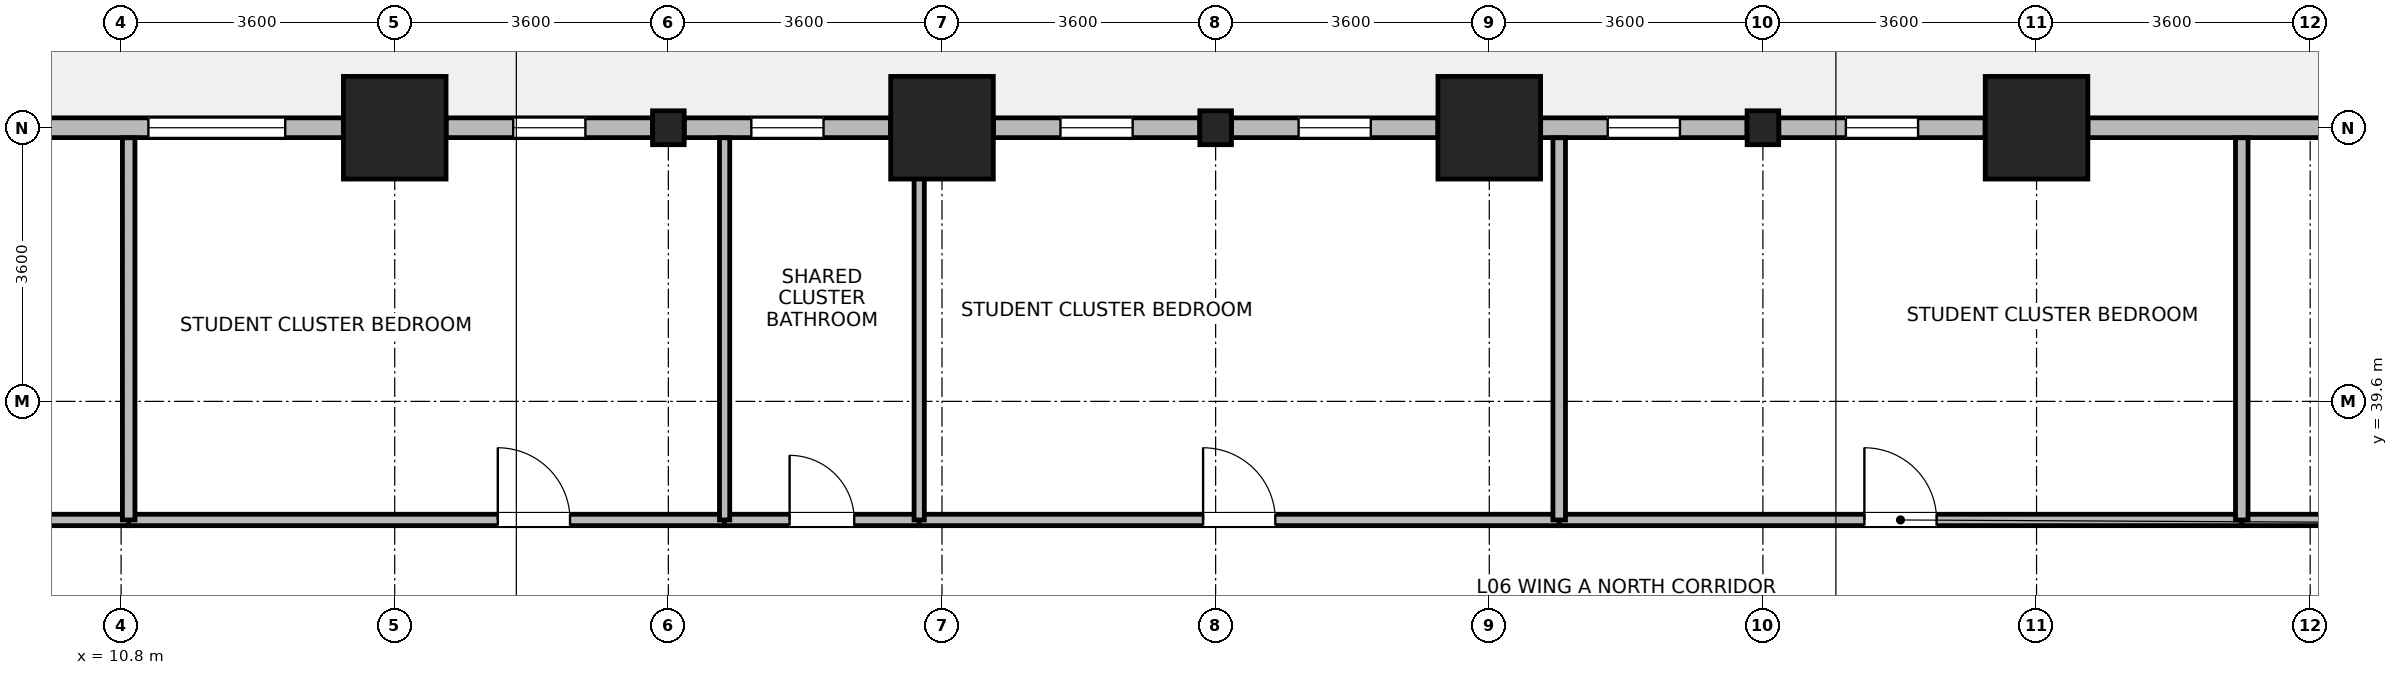
"""IFC4 building model, lengths in metres.
Left out: names, types, materials, properties, quantities, classifications, styles, units other than length and angle.
Written with IfcOpenShell. Run it as: python <this file> out.ifc"""

import sys

from ifc_helpers import new_model, si_unit, direction, frame, frame_2d, origin, origin_2d, place, context, subcontext, project, spatial, rectangle, i_section, extrude, source, transform, mapped, element, fill, save


model = new_model("IFC4")
c1 = context("Model", 3, precision=1e-05, world=origin(), true_north=direction((0.0, 1.0)))
c2 = subcontext(c1, "Body", "Model", "MODEL_VIEW")
j1 = project(units=[si_unit("LENGTHUNIT", "METRE"), si_unit("PLANEANGLEUNIT", "RADIAN")], contexts=[c1])
p1 = place(None, origin())
s1 = spatial("IfcSite", under=j1, at=p1, CompositionType="ELEMENT")
p2 = place(p1, origin())
s2 = spatial("IfcBuilding", under=s1, at=p2, CompositionType="ELEMENT")
p3 = place(p2, frame((0.0, 0.0, 29.0)))
s3 = spatial("IfcBuildingStorey", under=s2, at=p3, CompositionType="ELEMENT", Elevation=29.0)
m1 = source(origin(), c2, "Body", "SweptSolid", [
    extrude(rectangle(XDim=1.35, YDim=1.35, at=origin_2d()), origin(), (0.0, 0.0, 1.0), 3.7),
])
for number, where, z_axis, x_axis in (
    (1, (14.4, 43.2, 0.0), (0.0, 0.0, 1.0), (1.0, 0.0, 0.0)),
    (2, (21.6, 43.2, 0.0), (0.0, 0.0, 1.0), (1.0, 0.0, 0.0)),
    (3, (28.8, 43.2, 0.0), (0.0, 0.0, 1.0), (1.0, 0.0, 0.0)),
    (4, (36.0, 43.2, 0.0), (0.0, 0.0, 1.0), (1.0, 0.0, 0.0)),
):
    element("IfcColumn", number, at=place(p3, frame(where, z_axis=z_axis, x_axis=x_axis)), inside=s3, PredefinedType="COLUMN", context=c2, shape_type="MappedRepresentation", body=[
        mapped(m1, transform((0.0, 0.0, 0.0), x_axis=(1.0, 0.0, 0.0), y_axis=(0.0, 1.0, 0.0), z_axis=(0.0, 0.0, 1.0), scale=1.0)),
    ])
m2 = source(origin(), c2, "Body", "SweptSolid", [
    extrude(i_section(OverallWidth=0.416, OverallDepth=0.446, WebThickness=0.029, FlangeThickness=0.04, FilletRadius=0.015, at=origin_2d()), origin(), (0.0, 0.0, 1.0), 3.7),
])
for number, where, z_axis, x_axis in (
    (5, (18.0, 43.2, 0.0), (0.0, 0.0, 1.0), (1.0, 0.0, 0.0)),
    (6, (25.2, 43.2, 0.0), (0.0, 0.0, 1.0), (1.0, 0.0, 0.0)),
    (7, (32.4, 43.2, 0.0), (0.0, 0.0, 1.0), (1.0, 0.0, 0.0)),
):
    element("IfcColumn", number, at=place(p3, frame(where, z_axis=z_axis, x_axis=x_axis)), inside=s3, PredefinedType="COLUMN", context=c2, shape_type="MappedRepresentation", body=[
        mapped(m2, transform((0.0, 0.0, 0.0), x_axis=(1.0, 0.0, 0.0), y_axis=(0.0, 1.0, 0.0), z_axis=(0.0, 0.0, 1.0), scale=1.0)),
    ])
p4 = place(p3, frame((36.676, 43.2, 0.0), z_axis=(0.0, 0.0, 1.0), x_axis=(1.0, 0.0, 0.0)))
e8 = element("IfcWall", 8, at=p4, inside=s3, PredefinedType="STANDARD", context=c2, shape_type="SweptSolid", body=[
    extrude(rectangle(XDim=9.448, YDim=0.26, at=frame_2d((4.724, 0.0))), origin(), (0.0, 0.0, 1.0), 2.93),
])
p5 = place(p4, frame((3.824, 0.0, 0.85)))
e9 = element("IfcOpeningElement", 9, at=p5, cuts=e8, PredefinedType="OPENING", context=c2, shape_type="SweptSolid", body=[
    extrude(rectangle(XDim=1.8, YDim=1.85, at=frame_2d((0.9, 0.925))), frame((0.0, 0.14, 0.0), z_axis=(0.0, -1.0, 0.0), x_axis=(1.0, 0.0, 0.0)), (0.0, 0.0, 1.0), 0.28),
])
p6 = place(p4, frame((6.973, 0.0, 0.85)))
e10 = element("IfcOpeningElement", 10, at=p6, cuts=e8, PredefinedType="OPENING", context=c2, shape_type="SweptSolid", body=[
    extrude(rectangle(XDim=1.8, YDim=1.85, at=frame_2d((0.9, 0.925))), frame((0.0, 0.14, 0.0), z_axis=(0.0, -1.0, 0.0), x_axis=(1.0, 0.0, 0.0)), (0.0, 0.0, 1.0), 0.28),
])
p7 = place(p3, frame((32.609, 43.2, 0.0), z_axis=(0.0, 0.0, 1.0), x_axis=(1.0, 0.0, 0.0)))
e11 = element("IfcWall", 11, at=p7, inside=s3, PredefinedType="STANDARD", context=c2, shape_type="SweptSolid", body=[
    extrude(rectangle(XDim=2.715, YDim=0.26, at=frame_2d((1.357, 0.0))), origin(), (0.0, 0.0, 1.0), 2.93),
])
p8 = place(p7, frame((0.883, 0.0, 0.85)))
e12 = element("IfcOpeningElement", 12, at=p8, cuts=e11, PredefinedType="OPENING", context=c2, shape_type="SweptSolid", body=[
    extrude(rectangle(XDim=0.95, YDim=1.75, at=frame_2d((0.475, 0.875))), frame((0.0, 0.14, 0.0), z_axis=(0.0, -1.0, 0.0), x_axis=(1.0, 0.0, 0.0)), (0.0, 0.0, 1.0), 0.28),
])
p9 = place(p3, frame((29.476, 43.2, 0.0), z_axis=(0.0, 0.0, 1.0), x_axis=(1.0, 0.0, 0.0)))
e13 = element("IfcWall", 13, at=p9, inside=s3, PredefinedType="STANDARD", context=c2, shape_type="SweptSolid", body=[
    extrude(rectangle(XDim=2.715, YDim=0.26, at=frame_2d((1.357, 0.0))), origin(), (0.0, 0.0, 1.0), 2.93),
])
p10 = place(p9, frame((0.883, 0.0, 0.85)))
e14 = element("IfcOpeningElement", 14, at=p10, cuts=e13, PredefinedType="OPENING", context=c2, shape_type="SweptSolid", body=[
    extrude(rectangle(XDim=0.95, YDim=1.75, at=frame_2d((0.475, 0.875))), frame((0.0, 0.14, 0.0), z_axis=(0.0, -1.0, 0.0), x_axis=(1.0, 0.0, 0.0)), (0.0, 0.0, 1.0), 0.28),
])
p11 = place(p3, frame((25.409, 43.2, 0.0), z_axis=(0.0, 0.0, 1.0), x_axis=(1.0, 0.0, 0.0)))
e15 = element("IfcWall", 15, at=p11, inside=s3, PredefinedType="STANDARD", context=c2, shape_type="SweptSolid", body=[
    extrude(rectangle(XDim=2.715, YDim=0.26, at=frame_2d((1.357, 0.0))), origin(), (0.0, 0.0, 1.0), 2.93),
])
p12 = place(p11, frame((0.883, 0.0, 0.85)))
e16 = element("IfcOpeningElement", 16, at=p12, cuts=e15, PredefinedType="OPENING", context=c2, shape_type="SweptSolid", body=[
    extrude(rectangle(XDim=0.95, YDim=1.75, at=frame_2d((0.475, 0.875))), frame((0.0, 0.14, 0.0), z_axis=(0.0, -1.0, 0.0), x_axis=(1.0, 0.0, 0.0)), (0.0, 0.0, 1.0), 0.28),
])
p13 = place(p3, frame((22.276, 43.2, 0.0), z_axis=(0.0, 0.0, 1.0), x_axis=(1.0, 0.0, 0.0)))
e17 = element("IfcWall", 17, at=p13, inside=s3, PredefinedType="STANDARD", context=c2, shape_type="SweptSolid", body=[
    extrude(rectangle(XDim=2.715, YDim=0.26, at=frame_2d((1.357, 0.0))), origin(), (0.0, 0.0, 1.0), 2.93),
])
p14 = place(p13, frame((0.883, 0.0, 0.85)))
e18 = element("IfcOpeningElement", 18, at=p14, cuts=e17, PredefinedType="OPENING", context=c2, shape_type="SweptSolid", body=[
    extrude(rectangle(XDim=0.95, YDim=1.75, at=frame_2d((0.475, 0.875))), frame((0.0, 0.14, 0.0), z_axis=(0.0, -1.0, 0.0), x_axis=(1.0, 0.0, 0.0)), (0.0, 0.0, 1.0), 0.28),
])
p15 = place(p3, frame((18.209, 43.2, 0.0), z_axis=(0.0, 0.0, 1.0), x_axis=(1.0, 0.0, 0.0)))
e19 = element("IfcWall", 19, at=p15, inside=s3, PredefinedType="STANDARD", context=c2, shape_type="SweptSolid", body=[
    extrude(rectangle(XDim=2.715, YDim=0.26, at=frame_2d((1.357, 0.0))), origin(), (0.0, 0.0, 1.0), 2.93),
])
p16 = place(p15, frame((0.883, 0.0, 0.85)))
e20 = element("IfcOpeningElement", 20, at=p16, cuts=e19, PredefinedType="OPENING", context=c2, shape_type="SweptSolid", body=[
    extrude(rectangle(XDim=0.95, YDim=1.75, at=frame_2d((0.475, 0.875))), frame((0.0, 0.14, 0.0), z_axis=(0.0, -1.0, 0.0), x_axis=(1.0, 0.0, 0.0)), (0.0, 0.0, 1.0), 0.28),
])
p17 = place(p3, frame((15.076, 43.2, 0.0), z_axis=(0.0, 0.0, 1.0), x_axis=(1.0, 0.0, 0.0)))
e21 = element("IfcWall", 21, at=p17, inside=s3, PredefinedType="STANDARD", context=c2, shape_type="SweptSolid", body=[
    extrude(rectangle(XDim=2.715, YDim=0.26, at=frame_2d((1.357, 0.0))), origin(), (0.0, 0.0, 1.0), 2.93),
])
p18 = place(p17, frame((0.883, 0.0, 0.85)))
e22 = element("IfcOpeningElement", 22, at=p18, cuts=e21, PredefinedType="OPENING", context=c2, shape_type="SweptSolid", body=[
    extrude(rectangle(XDim=0.95, YDim=1.75, at=frame_2d((0.475, 0.875))), frame((0.0, 0.14, 0.0), z_axis=(0.0, -1.0, 0.0), x_axis=(1.0, 0.0, 0.0)), (0.0, 0.0, 1.0), 0.28),
])
p19 = place(p3, frame((3.735, 43.2, 0.0), z_axis=(0.0, 0.0, 1.0), x_axis=(1.0, 0.0, 0.0)))
e23 = element("IfcWall", 23, at=p19, inside=s3, PredefinedType="STANDARD", context=c2, shape_type="SweptSolid", body=[
    extrude(rectangle(XDim=9.989, YDim=0.26, at=frame_2d((4.995, 0.0))), origin(), (0.0, 0.0, 1.0), 3.43),
])
p20 = place(p19, frame((0.765, 0.0, 0.85)))
e24 = element("IfcOpeningElement", 24, at=p20, cuts=e23, PredefinedType="OPENING", context=c2, shape_type="SweptSolid", body=[
    extrude(rectangle(XDim=1.8, YDim=1.85, at=frame_2d((0.9, 0.925))), frame((0.0, 0.14, 0.0), z_axis=(0.0, -1.0, 0.0), x_axis=(1.0, 0.0, 0.0)), (0.0, 0.0, 1.0), 0.28),
])
p21 = place(p19, frame((4.094, 0.0, 0.85)))
e25 = element("IfcOpeningElement", 25, at=p21, cuts=e23, PredefinedType="OPENING", context=c2, shape_type="SweptSolid", body=[
    extrude(rectangle(XDim=1.8, YDim=1.85, at=frame_2d((0.9, 0.925))), frame((0.0, 0.14, 0.0), z_axis=(0.0, -1.0, 0.0), x_axis=(1.0, 0.0, 0.0)), (0.0, 0.0, 1.0), 0.28),
])
p22 = place(p19, frame((7.424, 0.0, 0.85)))
e26 = element("IfcOpeningElement", 26, at=p22, cuts=e23, PredefinedType="OPENING", context=c2, shape_type="SweptSolid", body=[
    extrude(rectangle(XDim=1.8, YDim=1.85, at=frame_2d((0.9, 0.925))), frame((0.0, 0.14, 0.0), z_axis=(0.0, -1.0, 0.0), x_axis=(1.0, 0.0, 0.0)), (0.0, 0.0, 1.0), 0.28),
])
p23 = place(p3, frame((38.7, 38.04, 0.0), z_axis=(0.0, 0.0, 1.0), x_axis=(1.0, 0.0, 0.0)))
e27 = element("IfcWall", 27, at=p23, inside=s3, PredefinedType="PARTITIONING", context=c2, shape_type="SweptSolid", body=[
    extrude(rectangle(XDim=17.06, YDim=0.15, at=frame_2d((8.53, 0.0))), origin(), (0.0, 0.0, 1.0), 3.43),
])
p24 = place(p23, frame((6.374, 0.0, 0.0)))
e28 = element("IfcOpeningElement", 28, at=p24, cuts=e27, PredefinedType="OPENING", context=c2, shape_type="SweptSolid", body=[
    extrude(rectangle(XDim=0.9, YDim=2.08, at=frame_2d((0.45, 1.04))), frame((0.0, 0.085, 0.0), z_axis=(0.0, -1.0, 0.0), x_axis=(1.0, 0.0, 0.0)), (0.0, 0.0, 1.0), 0.17),
])
p25 = place(p3, frame((29.72, 38.04, 0.0), z_axis=(0.0, 0.0, 1.0), x_axis=(1.0, 0.0, 0.0)))
e29 = element("IfcWall", 29, at=p25, inside=s3, PredefinedType="PARTITIONING", context=c2, shape_type="SweptSolid", body=[
    extrude(rectangle(XDim=8.98, YDim=0.15, at=frame_2d((4.49, 0.0))), origin(), (0.0, 0.0, 1.0), 3.43),
])
p26 = place(p25, frame((4.015, 0.0, 0.0)))
e30 = element("IfcOpeningElement", 30, at=p26, cuts=e29, PredefinedType="OPENING", context=c2, shape_type="SweptSolid", body=[
    extrude(rectangle(XDim=0.95, YDim=2.1, at=frame_2d((0.475, 1.05))), frame((0.0, 0.085, 0.0), z_axis=(0.0, -1.0, 0.0), x_axis=(1.0, 0.0, 0.0)), (0.0, 0.0, 1.0), 0.17),
])
p27 = place(p3, frame((21.3, 38.04, 0.0), z_axis=(0.0, 0.0, 1.0), x_axis=(1.0, 0.0, 0.0)))
e31 = element("IfcWall", 31, at=p27, inside=s3, PredefinedType="PARTITIONING", context=c2, shape_type="SweptSolid", body=[
    extrude(rectangle(XDim=8.42, YDim=0.15, at=frame_2d((4.21, 0.0))), origin(), (0.0, 0.0, 1.0), 3.43),
])
p28 = place(p27, frame((3.735, 0.0, 0.0)))
e32 = element("IfcOpeningElement", 32, at=p28, cuts=e31, PredefinedType="OPENING", context=c2, shape_type="SweptSolid", body=[
    extrude(rectangle(XDim=0.95, YDim=2.1, at=frame_2d((0.475, 1.05))), frame((0.0, 0.085, 0.0), z_axis=(0.0, -1.0, 0.0), x_axis=(1.0, 0.0, 0.0)), (0.0, 0.0, 1.0), 0.17),
])
p29 = place(p3, frame((10.9, 38.04, 0.0), z_axis=(0.0, 0.0, 1.0), x_axis=(1.0, 0.0, 0.0)))
e33 = element("IfcWall", 33, at=p29, inside=s3, PredefinedType="PARTITIONING", context=c2, shape_type="SweptSolid", body=[
    extrude(rectangle(XDim=7.84, YDim=0.15, at=frame_2d((3.92, 0.0))), origin(), (0.0, 0.0, 1.0), 3.43),
])
p30 = place(p29, frame((4.856, 0.0, 0.0)))
e34 = element("IfcOpeningElement", 34, at=p30, cuts=e33, PredefinedType="OPENING", context=c2, shape_type="SweptSolid", body=[
    extrude(rectangle(XDim=0.95, YDim=2.1, at=frame_2d((0.475, 1.05))), frame((0.0, 0.085, 0.0), z_axis=(0.0, -1.0, 0.0), x_axis=(1.0, 0.0, 0.0)), (0.0, 0.0, 1.0), 0.17),
])
p31 = place(p3, frame((3.732, 38.04, 0.0), z_axis=(0.0, 0.0, 1.0), x_axis=(1.0, 0.0, 0.0)))
e35 = element("IfcWall", 35, at=p31, inside=s3, PredefinedType="PARTITIONING", context=c2, shape_type="SweptSolid", body=[
    extrude(rectangle(XDim=7.168, YDim=0.15, at=frame_2d((3.584, 0.0))), origin(), (0.0, 0.0, 1.0), 3.43),
])
p32 = place(p31, frame((4.399, 0.0, 0.0)))
e36 = element("IfcOpeningElement", 36, at=p32, cuts=e35, PredefinedType="OPENING", context=c2, shape_type="SweptSolid", body=[
    extrude(rectangle(XDim=0.95, YDim=2.1, at=frame_2d((0.475, 1.05))), frame((0.0, 0.085, 0.0), z_axis=(0.0, -1.0, 0.0), x_axis=(1.0, 0.0, 0.0)), (0.0, 0.0, 1.0), 0.17),
])
p33 = place(p3, frame((18.74, 38.04, 0.0), z_axis=(0.0, 0.0, 1.0), x_axis=(1.0, 0.0, 0.0)))
e37 = element("IfcWall", 37, at=p33, inside=s3, PredefinedType="PARTITIONING", context=c2, shape_type="SweptSolid", body=[
    extrude(rectangle(XDim=2.56, YDim=0.15, at=frame_2d((1.28, 0.0))), origin(), (0.0, 0.0, 1.0), 3.43),
])
p34 = place(p33, frame((0.855, 0.0, 0.0)))
e38 = element("IfcOpeningElement", 38, at=p34, cuts=e37, PredefinedType="OPENING", context=c2, shape_type="SweptSolid", body=[
    extrude(rectangle(XDim=0.85, YDim=2.04, at=frame_2d((0.425, 1.02))), frame((0.0, 0.085, 0.0), z_axis=(0.0, -1.0, 0.0), x_axis=(1.0, 0.0, 0.0)), (0.0, 0.0, 1.0), 0.17),
])
p35 = place(p3, frame((10.9, 38.04, 0.0), z_axis=(0.0, 0.0, 1.0), x_axis=(0.0, 1.0, 0.0)))
e39 = element("IfcWall", 39, at=p35, inside=s3, PredefinedType="PARTITIONING", context=c2, shape_type="SweptSolid", body=[
    extrude(rectangle(XDim=5.028, YDim=0.165, at=frame_2d((2.514, 0.0))), origin(), (0.0, 0.0, 1.0), 3.43),
])
for number, where, z_axis, x_axis in (
    (40, (18.74, 38.04, 0.0), (0.0, 0.0, 1.0), (0.0, 1.0, 0.0)),
    (41, (21.3, 38.04, 0.0), (0.0, 0.0, 1.0), (0.0, 1.0, 0.0)),
):
    element("IfcWall", number, at=place(p3, frame(where, z_axis=z_axis, x_axis=x_axis)), inside=s3, PredefinedType="PARTITIONING", context=c2, shape_type="SweptSolid", body=[
        extrude(rectangle(XDim=5.028, YDim=0.135, at=frame_2d((2.514, 0.0))), origin(), (0.0, 0.0, 1.0), 3.43),
    ])
for number, where, z_axis, x_axis in (
    (42, (29.72, 38.04, 0.0), (0.0, 0.0, 1.0), (0.0, 1.0, 0.0)),
    (43, (38.7, 38.04, 0.0), (0.0, 0.0, 1.0), (0.0, 1.0, 0.0)),
):
    element("IfcWall", number, at=place(p3, frame(where, z_axis=z_axis, x_axis=x_axis)), inside=s3, PredefinedType="PARTITIONING", context=c2, shape_type="SweptSolid", body=[
        extrude(rectangle(XDim=5.028, YDim=0.165, at=frame_2d((2.514, 0.0))), origin(), (0.0, 0.0, 1.0), 3.43),
    ])
p36 = place(p8, origin())
e44 = element("IfcWindow", 44, at=p36, inside=s3, PartitioningType="SINGLE_PANEL", PredefinedType="WINDOW", context=c2, shape_type="SweptSolid", body=[
    extrude(rectangle(XDim=0.95, YDim=1.75, at=frame_2d((0.475, 0.875))), frame((0.0, 0.03, 0.0), z_axis=(0.0, -1.0, 0.0), x_axis=(1.0, 0.0, 0.0)), (0.0, 0.0, 1.0), 0.06),
])
fill(e12, e44)
p37 = place(p10, origin())
e45 = element("IfcWindow", 45, at=p37, inside=s3, PartitioningType="SINGLE_PANEL", PredefinedType="WINDOW", context=c2, shape_type="SweptSolid", body=[
    extrude(rectangle(XDim=0.95, YDim=1.75, at=frame_2d((0.475, 0.875))), frame((0.0, 0.03, 0.0), z_axis=(0.0, -1.0, 0.0), x_axis=(1.0, 0.0, 0.0)), (0.0, 0.0, 1.0), 0.06),
])
fill(e14, e45)
p38 = place(p12, origin())
e46 = element("IfcWindow", 46, at=p38, inside=s3, PartitioningType="SINGLE_PANEL", PredefinedType="WINDOW", context=c2, shape_type="SweptSolid", body=[
    extrude(rectangle(XDim=0.95, YDim=1.75, at=frame_2d((0.475, 0.875))), frame((0.0, 0.03, 0.0), z_axis=(0.0, -1.0, 0.0), x_axis=(1.0, 0.0, 0.0)), (0.0, 0.0, 1.0), 0.06),
])
fill(e16, e46)
p39 = place(p14, origin())
e47 = element("IfcWindow", 47, at=p39, inside=s3, PartitioningType="SINGLE_PANEL", PredefinedType="WINDOW", context=c2, shape_type="SweptSolid", body=[
    extrude(rectangle(XDim=0.95, YDim=1.75, at=frame_2d((0.475, 0.875))), frame((0.0, 0.03, 0.0), z_axis=(0.0, -1.0, 0.0), x_axis=(1.0, 0.0, 0.0)), (0.0, 0.0, 1.0), 0.06),
])
fill(e18, e47)
p40 = place(p16, origin())
e48 = element("IfcWindow", 48, at=p40, inside=s3, PartitioningType="SINGLE_PANEL", PredefinedType="WINDOW", context=c2, shape_type="SweptSolid", body=[
    extrude(rectangle(XDim=0.95, YDim=1.75, at=frame_2d((0.475, 0.875))), frame((0.0, 0.03, 0.0), z_axis=(0.0, -1.0, 0.0), x_axis=(1.0, 0.0, 0.0)), (0.0, 0.0, 1.0), 0.06),
])
fill(e20, e48)
p41 = place(p18, origin())
e49 = element("IfcWindow", 49, at=p41, inside=s3, PartitioningType="SINGLE_PANEL", PredefinedType="WINDOW", context=c2, shape_type="SweptSolid", body=[
    extrude(rectangle(XDim=0.95, YDim=1.75, at=frame_2d((0.475, 0.875))), frame((0.0, 0.03, 0.0), z_axis=(0.0, -1.0, 0.0), x_axis=(1.0, 0.0, 0.0)), (0.0, 0.0, 1.0), 0.06),
])
fill(e22, e49)
p42 = place(p22, origin())
e50 = element("IfcWindow", 50, at=p42, inside=s3, PartitioningType="SINGLE_PANEL", PredefinedType="WINDOW", context=c2, shape_type="SweptSolid", body=[
    extrude(rectangle(XDim=1.8, YDim=1.85, at=frame_2d((0.9, 0.925))), frame((0.0, 0.03, 0.0), z_axis=(0.0, -1.0, 0.0), x_axis=(1.0, 0.0, 0.0)), (0.0, 0.0, 1.0), 0.06),
])
fill(e26, e50)
p43 = place(p26, origin())
e51 = element("IfcDoor", 51, at=p43, inside=s3, OperationType="SINGLE_SWING_LEFT", PredefinedType="DOOR", context=c2, shape_type="SweptSolid", body=[
    extrude(rectangle(XDim=0.95, YDim=2.1, at=frame_2d((0.475, 1.05))), frame((0.0, 0.025, 0.0), z_axis=(0.0, -1.0, 0.0), x_axis=(1.0, 0.0, 0.0)), (0.0, 0.0, 1.0), 0.05),
])
fill(e30, e51)
p44 = place(p28, origin())
e52 = element("IfcDoor", 52, at=p44, inside=s3, OperationType="SINGLE_SWING_LEFT", PredefinedType="DOOR", context=c2, shape_type="SweptSolid", body=[
    extrude(rectangle(XDim=0.95, YDim=2.1, at=frame_2d((0.475, 1.05))), frame((0.0, 0.025, 0.0), z_axis=(0.0, -1.0, 0.0), x_axis=(1.0, 0.0, 0.0)), (0.0, 0.0, 1.0), 0.05),
])
fill(e32, e52)
p45 = place(p30, origin())
e53 = element("IfcDoor", 53, at=p45, inside=s3, OperationType="SINGLE_SWING_LEFT", PredefinedType="DOOR", context=c2, shape_type="SweptSolid", body=[
    extrude(rectangle(XDim=0.95, YDim=2.1, at=frame_2d((0.475, 1.05))), frame((0.0, 0.025, 0.0), z_axis=(0.0, -1.0, 0.0), x_axis=(1.0, 0.0, 0.0)), (0.0, 0.0, 1.0), 0.05),
])
fill(e34, e53)
p46 = place(p34, origin())
e54 = element("IfcDoor", 54, at=p46, inside=s3, OperationType="SINGLE_SWING_LEFT", PredefinedType="DOOR", context=c2, shape_type="SweptSolid", body=[
    extrude(rectangle(XDim=0.85, YDim=2.04, at=frame_2d((0.425, 1.02))), frame((0.0, 0.025, 0.0), z_axis=(0.0, -1.0, 0.0), x_axis=(1.0, 0.0, 0.0)), (0.0, 0.0, 1.0), 0.05),
])
fill(e38, e54)
save(model, sys.argv[1])
